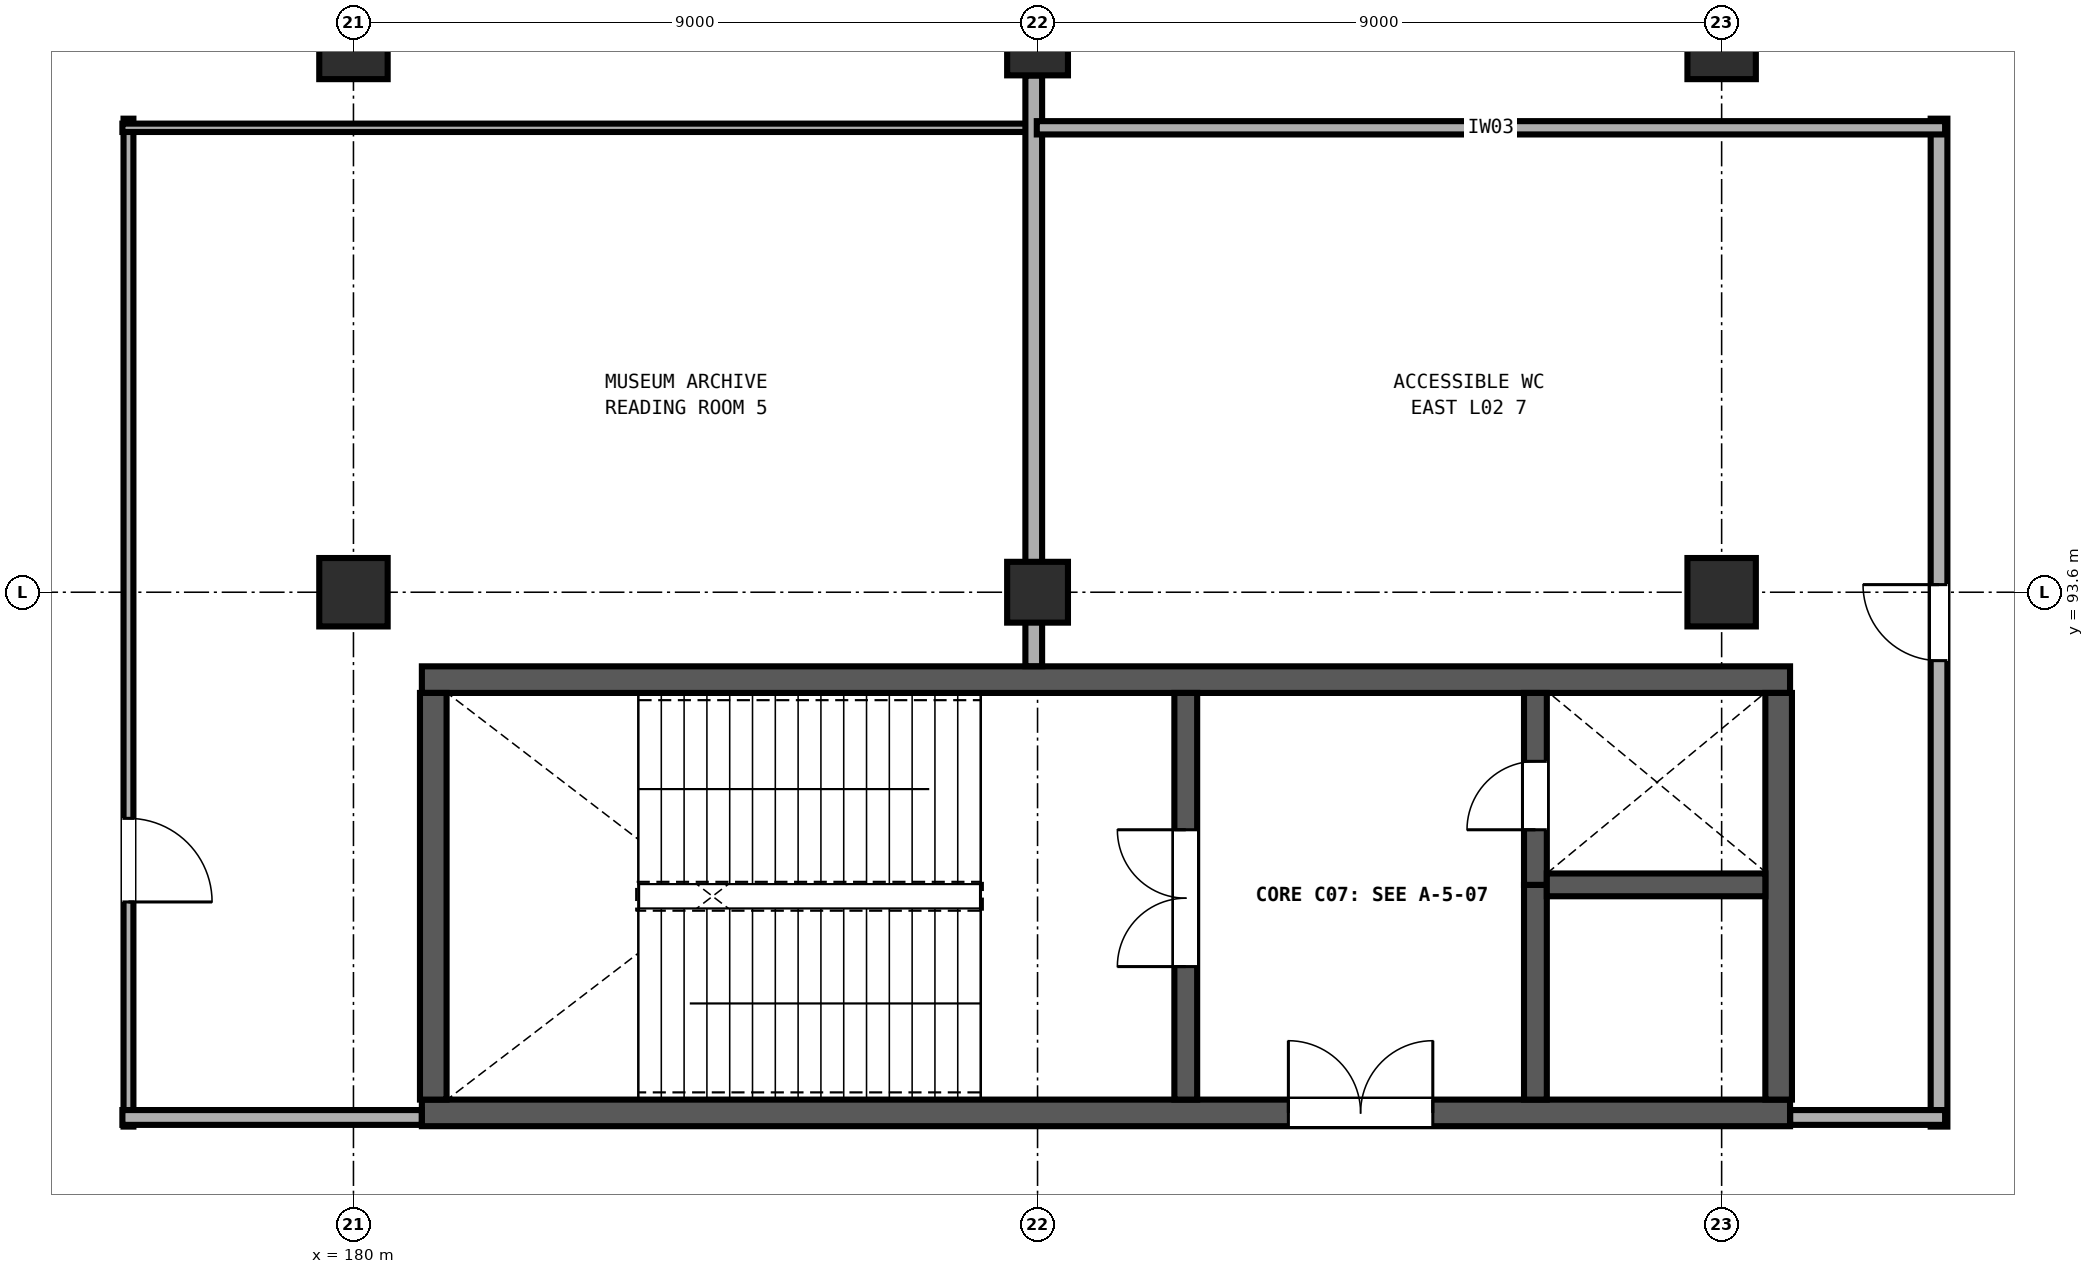
"""IFC4 building model, lengths in metres.
Left out: names, types, materials, properties, quantities, classifications, styles, units other than length and angle.
Written with IfcOpenShell. Run it as: python <this file> out.ifc"""

import sys

from ifc_helpers import new_model, si_unit, direction, frame, frame_2d, origin, origin_2d, place, context, subcontext, project, spatial, rectangle, extrude, element, fill, save


model = new_model("IFC4")
c1 = context("Model", 3, precision=1e-05, world=origin(), true_north=direction((0.0, 1.0)))
c2 = subcontext(c1, "Body", "Model", "MODEL_VIEW")
j1 = project(units=[si_unit("LENGTHUNIT", "METRE"), si_unit("PLANEANGLEUNIT", "RADIAN")], contexts=[c1])
p1 = place(None, origin())
s1 = spatial("IfcSite", under=j1, at=p1, CompositionType="ELEMENT")
p2 = place(p1, origin())
s2 = spatial("IfcBuilding", under=s1, at=p2, CompositionType="ELEMENT")
p3 = place(p2, frame((0.0, 0.0, 9.6)))
s3 = spatial("IfcBuildingStorey", under=s2, at=p3, CompositionType="ELEMENT", Elevation=9.6)
for number, where, z_axis, x_axis in (
    (1, (180.0, 93.6, 0.0), (0.0, 0.0, 1.0), (1.0, 0.0, 0.0)),
    (2, (180.0, 100.8, 0.0), (0.0, 0.0, 1.0), (1.0, 0.0, 0.0)),
):
    element("IfcColumn", number, at=place(p3, frame(where, z_axis=z_axis, x_axis=x_axis)), inside=s3, PredefinedType="COLUMN", context=c2, shape_type="SweptSolid", body=[
        extrude(rectangle(XDim=0.9, YDim=0.9, at=origin_2d()), origin(), (0.0, 0.0, 1.0), 4.8),
    ])
for number, where, z_axis, x_axis in (
    (3, (189.0, 93.6, 0.0), (0.0, 0.0, 1.0), (1.0, 0.0, 0.0)),
    (4, (189.0, 100.8, 0.0), (0.0, 0.0, 1.0), (1.0, 0.0, 0.0)),
):
    element("IfcColumn", number, at=place(p3, frame(where, z_axis=z_axis, x_axis=x_axis)), inside=s3, PredefinedType="COLUMN", context=c2, shape_type="SweptSolid", body=[
        extrude(rectangle(XDim=0.8, YDim=0.8, at=origin_2d()), origin(), (0.0, 0.0, 1.0), 4.8),
    ])
for number, where, z_axis, x_axis in (
    (5, (198.0, 93.6, 0.0), (0.0, 0.0, 1.0), (1.0, 0.0, 0.0)),
    (6, (198.0, 100.8, 0.0), (0.0, 0.0, 1.0), (1.0, 0.0, 0.0)),
):
    element("IfcColumn", number, at=place(p3, frame(where, z_axis=z_axis, x_axis=x_axis)), inside=s3, PredefinedType="COLUMN", context=c2, shape_type="SweptSolid", body=[
        extrude(rectangle(XDim=0.9, YDim=0.9, at=origin_2d()), origin(), (0.0, 0.0, 1.0), 4.8),
    ])
p4 = place(p3, frame((180.9, 86.75, 0.0), z_axis=(0.0, 0.0, 1.0), x_axis=(1.0, 0.0, 0.0)))
e7 = element("IfcWall", 7, at=p4, inside=s3, PredefinedType="SHEAR", context=c2, shape_type="SweptSolid", body=[
    extrude(rectangle(XDim=18.0, YDim=0.35, at=frame_2d((9.0, 0.0))), origin(), (0.0, 0.0, 1.0), 4.5),
])
p5 = place(p4, frame((11.4, 0.0, 0.0)))
e8 = element("IfcOpeningElement", 8, at=p5, cuts=e7, PredefinedType="OPENING", context=c2, shape_type="SweptSolid", body=[
    extrude(rectangle(XDim=1.9, YDim=2.25, at=frame_2d((0.95, 1.125))), frame((0.0, 0.185, 0.0), z_axis=(0.0, -1.0, 0.0), x_axis=(1.0, 0.0, 0.0)), (0.0, 0.0, 1.0), 0.37),
])
p6 = place(p3, frame((198.9, 92.45, 0.0), z_axis=(0.0, 0.0, 1.0), x_axis=(-1.0, 0.0, 0.0)))
e9 = element("IfcWall", 9, at=p6, inside=s3, PredefinedType="SHEAR", context=c2, shape_type="SweptSolid", body=[
    extrude(rectangle(XDim=18.0, YDim=0.35, at=frame_2d((9.0, 0.0))), origin(), (0.0, 0.0, 1.0), 4.5),
])
for number, where, z_axis, x_axis in (
    (10, (181.05, 92.275, 0.0), (0.0, 0.0, 1.0), (0.0, -1.0, 0.0)),
    (11, (198.75, 86.925, 0.0), (0.0, 0.0, 1.0), (0.0, 1.0, 0.0)),
):
    element("IfcWall", number, at=place(p3, frame(where, z_axis=z_axis, x_axis=x_axis)), inside=s3, PredefinedType="SHEAR", context=c2, shape_type="SweptSolid", body=[
        extrude(rectangle(XDim=5.35, YDim=0.35, at=frame_2d((2.675, 0.0))), origin(), (0.0, 0.0, 1.0), 4.5),
    ])
p7 = place(p3, frame((190.95, 86.925, 0.0), z_axis=(0.0, 0.0, 1.0), x_axis=(0.0, 1.0, 0.0)))
e12 = element("IfcWall", 12, at=p7, inside=s3, PredefinedType="SHEAR", context=c2, shape_type="SweptSolid", body=[
    extrude(rectangle(XDim=5.35, YDim=0.3, at=frame_2d((2.675, 0.0))), origin(), (0.0, 0.0, 1.0), 4.5),
])
p8 = place(p7, frame((1.75, 0.0, 0.0)))
e13 = element("IfcOpeningElement", 13, at=p8, cuts=e12, PredefinedType="OPENING", context=c2, shape_type="SweptSolid", body=[
    extrude(rectangle(XDim=1.8, YDim=2.25, at=frame_2d((0.9, 1.125))), frame((0.0, 0.16, 0.0), z_axis=(0.0, -1.0, 0.0), x_axis=(1.0, 0.0, 0.0)), (0.0, 0.0, 1.0), 0.32),
])
p9 = place(p3, frame((195.55, 86.925, 0.0), z_axis=(0.0, 0.0, 1.0), x_axis=(0.0, 1.0, 0.0)))
e14 = element("IfcWall", 14, at=p9, inside=s3, PredefinedType="SHEAR", context=c2, shape_type="SweptSolid", body=[
    extrude(rectangle(XDim=2.825, YDim=0.3, at=frame_2d((1.413, 0.0))), origin(), (0.0, 0.0, 1.0), 4.5),
])
p10 = place(p3, frame((195.55, 89.75, 0.0), z_axis=(0.0, 0.0, 1.0), x_axis=(0.0, 1.0, 0.0)))
e15 = element("IfcWall", 15, at=p10, inside=s3, PredefinedType="SHEAR", context=c2, shape_type="SweptSolid", body=[
    extrude(rectangle(XDim=2.525, YDim=0.3, at=frame_2d((1.262, 0.0))), origin(), (0.0, 0.0, 1.0), 4.5),
])
p11 = place(p10, frame((0.725, 0.0, 0.0)))
e16 = element("IfcOpeningElement", 16, at=p11, cuts=e15, PredefinedType="OPENING", context=c2, shape_type="SweptSolid", body=[
    extrude(rectangle(XDim=0.9, YDim=2.1, at=frame_2d((0.45, 1.05))), frame((0.0, 0.16, 0.0), z_axis=(0.0, -1.0, 0.0), x_axis=(1.0, 0.0, 0.0)), (0.0, 0.0, 1.0), 0.32),
])
p12 = place(p3, frame((195.7, 89.75, 0.0), z_axis=(0.0, 0.0, 1.0), x_axis=(1.0, 0.0, 0.0)))
e17 = element("IfcWall", 17, at=p12, inside=s3, PredefinedType="SHEAR", context=c2, shape_type="SweptSolid", body=[
    extrude(rectangle(XDim=2.875, YDim=0.3, at=frame_2d((1.438, 0.0))), origin(), (0.0, 0.0, 1.0), 4.5),
])
p13 = place(p3, frame((177.04, 99.83, 0.0), z_axis=(0.0, 0.0, 1.0), x_axis=(0.0, -1.0, 0.0)))
e18 = element("IfcWall", 18, at=p13, inside=s3, PredefinedType="PARTITIONING", context=c2, shape_type="SweptSolid", body=[
    extrude(rectangle(XDim=13.26, YDim=0.13, at=frame_2d((6.63, 0.0))), origin(), (0.0, 0.0, 1.0), 3.56),
])
p14 = place(p13, frame((9.205, 0.0, 0.0)))
e19 = element("IfcOpeningElement", 19, at=p14, cuts=e18, PredefinedType="OPENING", context=c2, shape_type="SweptSolid", body=[
    extrude(rectangle(XDim=1.1, YDim=2.1, at=frame_2d((0.55, 1.05))), frame((0.0, 0.075, 0.0), z_axis=(0.0, -1.0, 0.0), x_axis=(1.0, 0.0, 0.0)), (0.0, 0.0, 1.0), 0.15),
])
p15 = place(p3, frame((176.96, 99.71, 0.0), z_axis=(0.0, 0.0, 1.0), x_axis=(1.0, 0.0, 0.0)))
e20 = element("IfcWall", 20, at=p15, inside=s3, PredefinedType="PARTITIONING", context=c2, shape_type="SweptSolid", body=[
    extrude(rectangle(XDim=11.95, YDim=0.11, at=frame_2d((5.975, 0.0))), origin(), (0.0, 0.0, 1.0), 3.56),
])
p16 = place(p3, frame((188.95, 100.398, 0.0), z_axis=(0.0, 0.0, 1.0), x_axis=(0.0, -1.0, 0.0)))
e21 = element("IfcWall", 21, at=p16, inside=s3, PredefinedType="PARTITIONING", context=c2, shape_type="SweptSolid", body=[
    extrude(rectangle(XDim=7.771, YDim=0.22, at=frame_2d((3.885, 0.0))), origin(), (0.0, 0.0, 1.0), 3.56),
])
p17 = place(p3, frame((180.898, 86.69, 0.0), z_axis=(0.0, 0.0, 1.0), x_axis=(-1.0, 0.0, 0.0)))
e22 = element("IfcWall", 22, at=p17, inside=s3, PredefinedType="PARTITIONING", context=c2, shape_type="SweptSolid", body=[
    extrude(rectangle(XDim=3.938, YDim=0.195, at=frame_2d((1.969, 0.0))), origin(), (0.0, 0.0, 1.0), 3.56),
])
p18 = place(p3, frame((200.86, 86.57, 0.0), z_axis=(0.0, 0.0, 1.0), x_axis=(0.0, 1.0, 0.0)))
e23 = element("IfcWall", 23, at=p18, inside=s3, PredefinedType="PARTITIONING", context=c2, shape_type="SweptSolid", body=[
    extrude(rectangle(XDim=13.26, YDim=0.22, at=frame_2d((6.63, 0.0))), origin(), (0.0, 0.0, 1.0), 3.56),
])
p19 = place(p18, frame((6.13, 0.0, 0.0)))
e24 = element("IfcOpeningElement", 24, at=p19, cuts=e23, PredefinedType="OPENING", context=c2, shape_type="SweptSolid", body=[
    extrude(rectangle(XDim=1.0, YDim=2.1, at=frame_2d((0.5, 1.05))), frame((0.0, 0.12, 0.0), z_axis=(0.0, -1.0, 0.0), x_axis=(1.0, 0.0, 0.0)), (0.0, 0.0, 1.0), 0.24),
])
p20 = place(p3, frame((200.94, 86.69, 0.0), z_axis=(0.0, 0.0, 1.0), x_axis=(-1.0, 0.0, 0.0)))
e25 = element("IfcWall", 25, at=p20, inside=s3, PredefinedType="PARTITIONING", context=c2, shape_type="SweptSolid", body=[
    extrude(rectangle(XDim=2.038, YDim=0.195, at=frame_2d((1.019, 0.0))), origin(), (0.0, 0.0, 1.0), 3.56),
])
p21 = place(p3, frame((188.99, 99.71, 0.0), z_axis=(0.0, 0.0, 1.0), x_axis=(1.0, 0.0, 0.0)))
e26 = element("IfcWall", 26, at=p21, inside=s3, PredefinedType="PARTITIONING", context=c2, shape_type="SweptSolid", body=[
    extrude(rectangle(XDim=11.95, YDim=0.175, at=frame_2d((5.975, 0.0))), origin(), (0.0, 0.0, 1.0), 3.56),
])
p22 = place(p8, origin())
e27 = element("IfcDoor", 27, at=p22, inside=s3, OperationType="DOUBLE_DOOR_SINGLE_SWING", PredefinedType="DOOR", context=c2, shape_type="SweptSolid", body=[
    extrude(rectangle(XDim=1.8, YDim=2.25, at=frame_2d((0.9, 1.125))), frame((0.0, 0.025, 0.0), z_axis=(0.0, -1.0, 0.0), x_axis=(1.0, 0.0, 0.0)), (0.0, 0.0, 1.0), 0.05),
])
fill(e13, e27)
p23 = place(p11, origin())
e28 = element("IfcDoor", 28, at=p23, inside=s3, OperationType="SINGLE_SWING_LEFT", PredefinedType="DOOR", context=c2, shape_type="SweptSolid", body=[
    extrude(rectangle(XDim=0.9, YDim=2.1, at=frame_2d((0.45, 1.05))), frame((0.0, 0.025, 0.0), z_axis=(0.0, -1.0, 0.0), x_axis=(1.0, 0.0, 0.0)), (0.0, 0.0, 1.0), 0.05),
])
fill(e16, e28)
p24 = place(p5, origin())
e29 = element("IfcDoor", 29, at=p24, inside=s3, OperationType="DOUBLE_DOOR_SINGLE_SWING", PredefinedType="DOOR", context=c2, shape_type="SweptSolid", body=[
    extrude(rectangle(XDim=1.9, YDim=2.25, at=frame_2d((0.95, 1.125))), frame((0.0, 0.025, 0.0), z_axis=(0.0, -1.0, 0.0), x_axis=(1.0, 0.0, 0.0)), (0.0, 0.0, 1.0), 0.05),
])
fill(e8, e29)
p25 = place(p14, origin())
e30 = element("IfcDoor", 30, at=p25, inside=s3, OperationType="SINGLE_SWING_RIGHT", PredefinedType="DOOR", context=c2, shape_type="SweptSolid", body=[
    extrude(rectangle(XDim=1.1, YDim=2.1, at=frame_2d((0.55, 1.05))), frame((0.0, 0.025, 0.0), z_axis=(0.0, -1.0, 0.0), x_axis=(1.0, 0.0, 0.0)), (0.0, 0.0, 1.0), 0.05),
])
fill(e19, e30)
p26 = place(p19, origin())
e31 = element("IfcDoor", 31, at=p26, inside=s3, OperationType="SINGLE_SWING_RIGHT", PredefinedType="DOOR", context=c2, shape_type="SweptSolid", body=[
    extrude(rectangle(XDim=1.0, YDim=2.1, at=frame_2d((0.5, 1.05))), frame((0.0, 0.025, 0.0), z_axis=(0.0, -1.0, 0.0), x_axis=(1.0, 0.0, 0.0)), (0.0, 0.0, 1.0), 0.05),
])
fill(e24, e31)
save(model, sys.argv[1])
